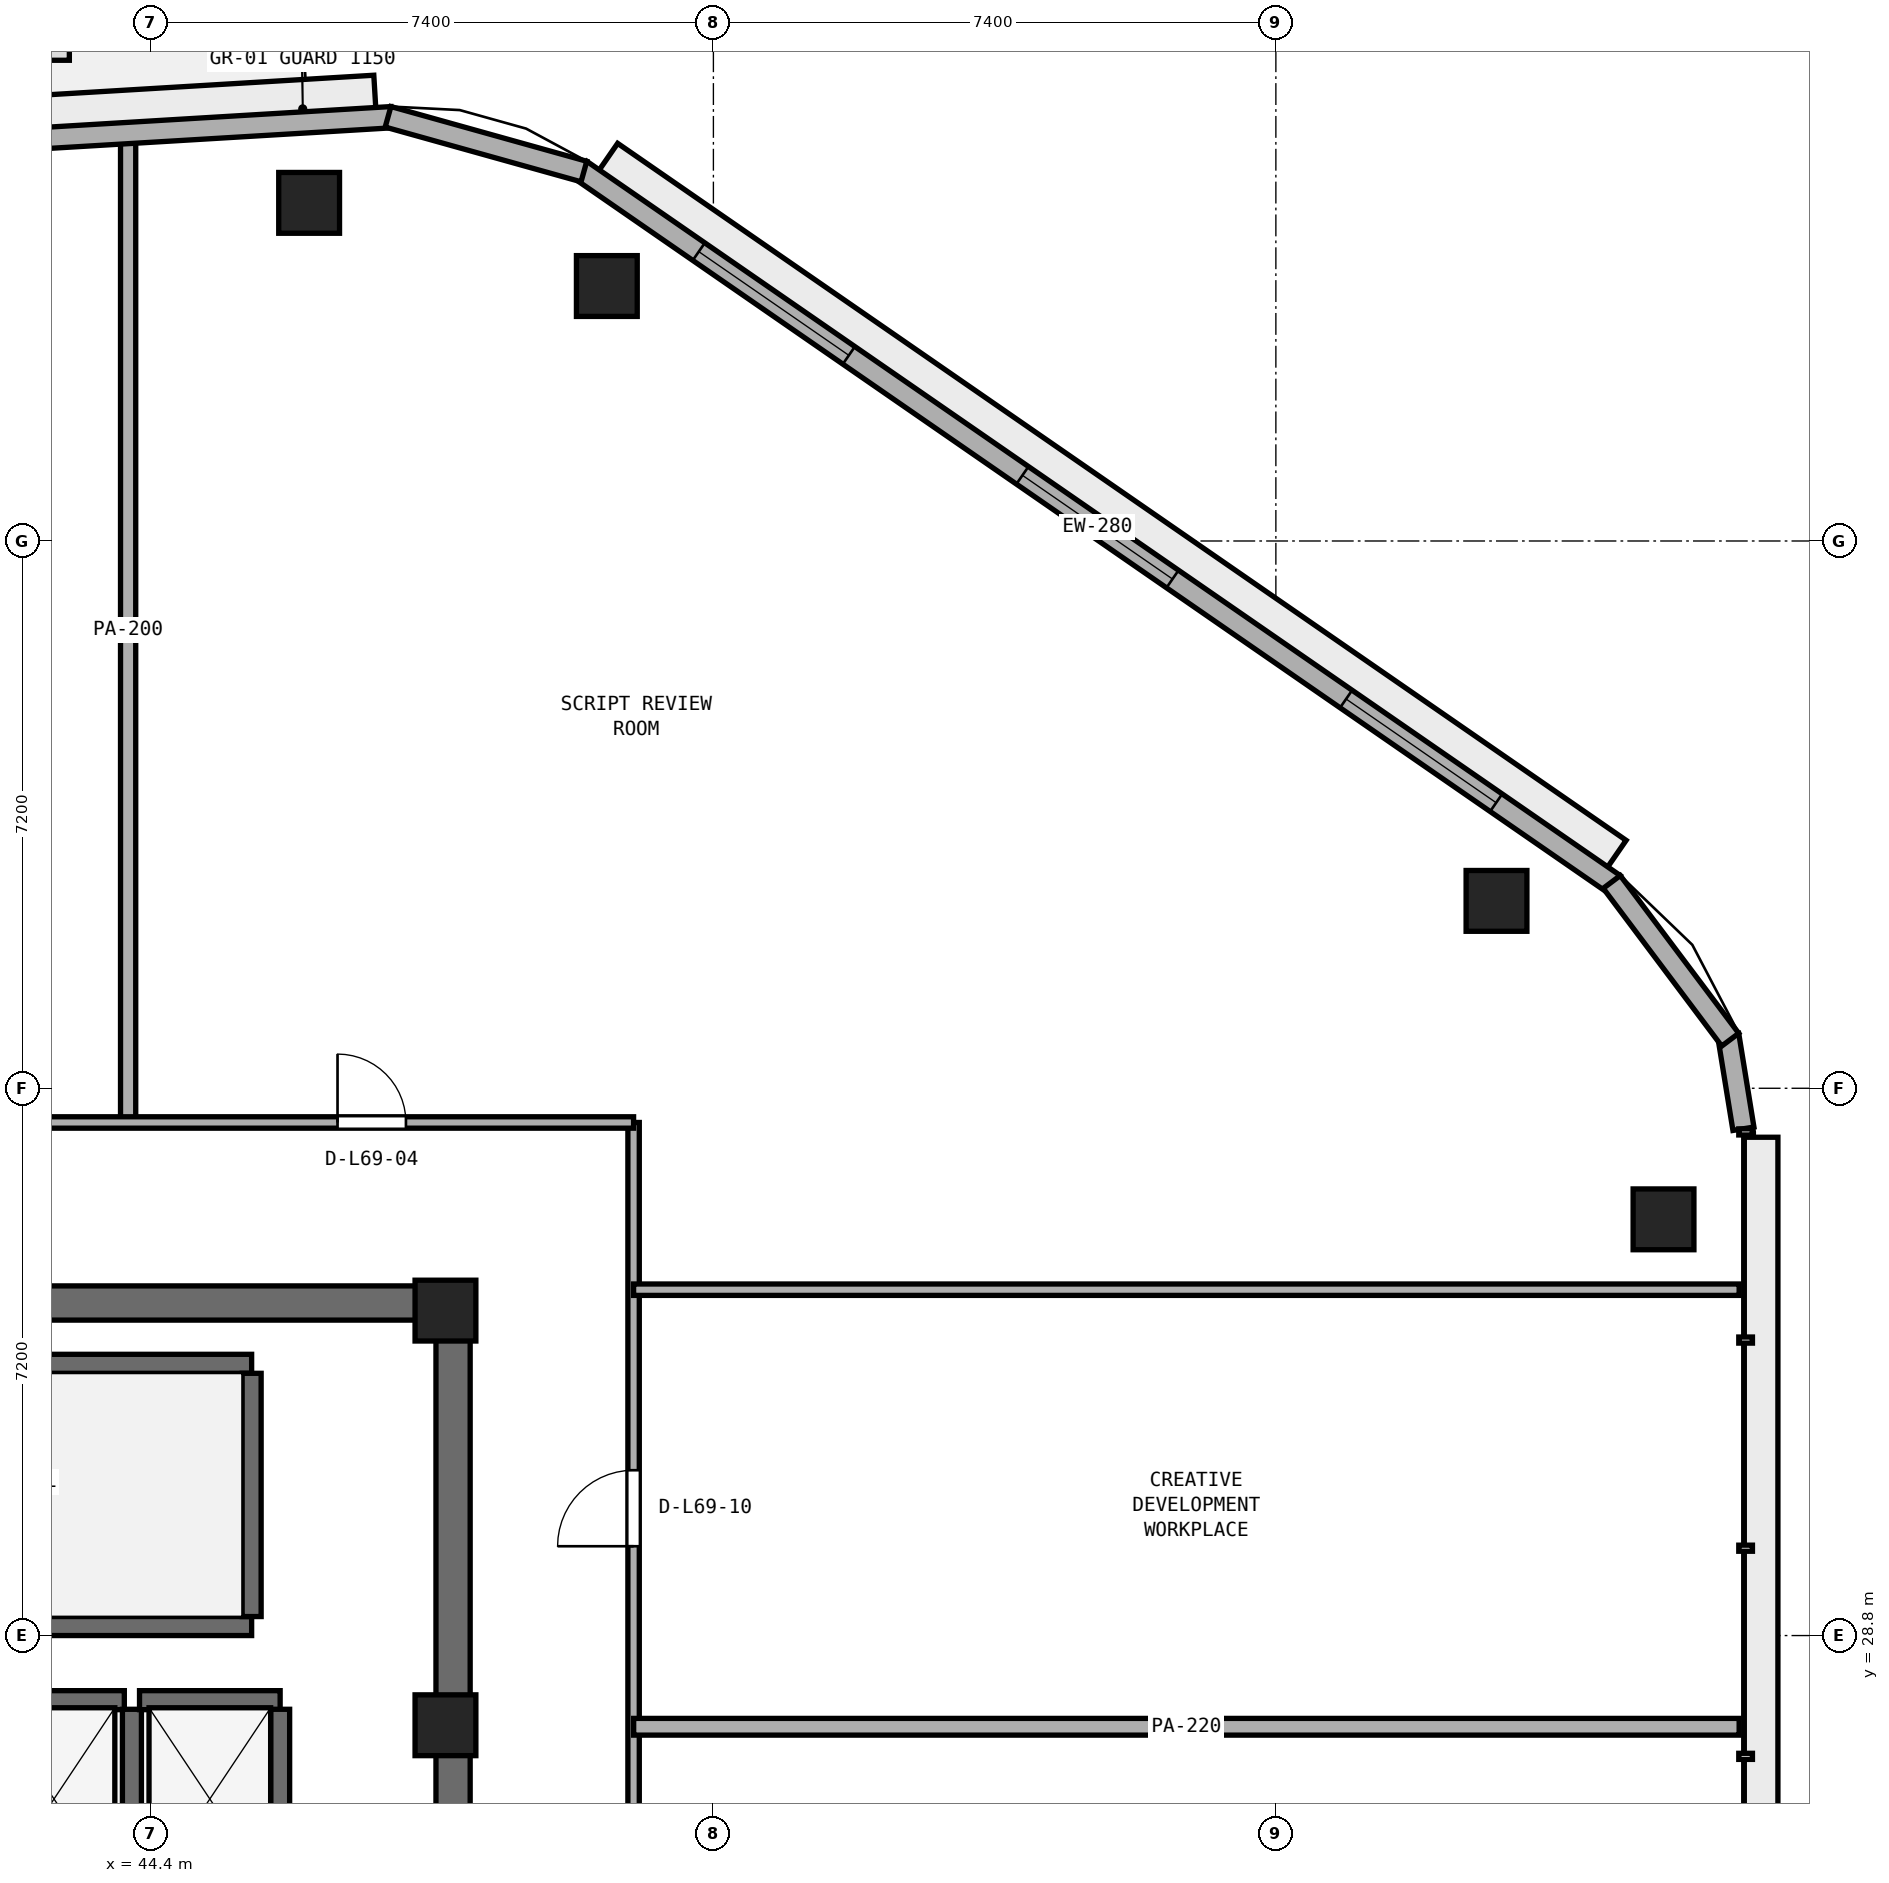
"""IFC4 building model, lengths in metres.
Left out: names, types, materials, properties, quantities, classifications, styles, units other than length and angle.
Written with IfcOpenShell. Run it as: python <this file> out.ifc"""

import sys

from ifc_helpers import new_model, si_unit, direction, frame, frame_2d, origin, origin_2d, place, context, subcontext, project, spatial, rectangle, extrude, element, fill, save


model = new_model("IFC4")
c1 = context("Model", 3, precision=1e-05, world=origin(), true_north=direction((0.0, 1.0)))
c2 = subcontext(c1, "Body", "Model", "MODEL_VIEW")
j1 = project(units=[si_unit("LENGTHUNIT", "METRE"), si_unit("PLANEANGLEUNIT", "RADIAN")], contexts=[c1])
p1 = place(None, origin())
s1 = spatial("IfcSite", under=j1, at=p1, CompositionType="ELEMENT")
p2 = place(p1, origin())
s2 = spatial("IfcBuilding", under=s1, at=p2, CompositionType="ELEMENT")
p3 = place(p2, frame((0.0, 0.0, 270.6)))
s3 = spatial("IfcBuildingStorey", under=s2, at=p3, CompositionType="ELEMENT", Elevation=270.6)
p4 = place(p3, frame((25.4, 33.175, 0.0), z_axis=(0.0, 0.0, 1.0), x_axis=(1.0, 0.0, 0.0)))
e1 = element("IfcWall", 1, at=p4, inside=s3, PredefinedType="SHEAR", context=c2, shape_type="SweptSolid", body=[
    extrude(rectangle(XDim=23.2, YDim=0.45, at=frame_2d((11.6, 0.0))), origin(), (0.0, 0.0, 1.0), 3.54),
])
p5 = place(p3, frame((48.375, 17.45, 0.0), z_axis=(0.0, 0.0, 1.0), x_axis=(0.0, 1.0, 0.0)))
e2 = element("IfcWall", 2, at=p5, inside=s3, PredefinedType="SHEAR", context=c2, shape_type="SweptSolid", body=[
    extrude(rectangle(XDim=15.5, YDim=0.45, at=frame_2d((7.75, 0.0))), origin(), (0.0, 0.0, 1.0), 3.54),
])
p6 = place(p5, frame((5.85, 0.0, 0.0)))
e3 = element("IfcOpeningElement", 3, at=p6, cuts=e2, PredefinedType="OPENING", context=c2, shape_type="SweptSolid", body=[
    extrude(rectangle(XDim=1.5, YDim=2.15, at=frame_2d((0.75, 1.075))), frame((0.0, 0.235, 0.0), z_axis=(0.0, -1.0, 0.0), x_axis=(1.0, 0.0, 0.0)), (0.0, 0.0, 1.0), 0.47),
])
for number, where, z_axis, x_axis in (
    (4, (48.275, 27.62, 0.0), (0.0, 0.0, 1.0), (1.0, 0.0, 0.0)),
    (5, (48.275, 33.075, 0.0), (0.0, 0.0, 1.0), (1.0, 0.0, 0.0)),
):
    element("IfcColumn", number, at=place(p3, frame(where, z_axis=z_axis, x_axis=x_axis)), inside=s3, PredefinedType="PILASTER", context=c2, shape_type="SweptSolid", body=[
        extrude(rectangle(XDim=0.8, YDim=0.8, at=origin_2d()), origin(), (0.0, 0.0, 1.0), 3.8),
    ])
for number, where, z_axis, x_axis in (
    (6, (64.3, 34.276, 0.0), (0.0, 0.0, 1.0), (1.0, 0.0, 0.0)),
    (7, (62.103, 38.465, 0.0), (0.0, 0.0, 1.0), (1.0, 0.0, 0.0)),
    (8, (50.398, 46.554, 0.0), (0.0, 0.0, 1.0), (1.0, 0.0, 0.0)),
    (9, (46.481, 47.648, 0.0), (0.0, 0.0, 1.0), (1.0, 0.0, 0.0)),
):
    element("IfcColumn", number, at=place(p3, frame(where, z_axis=z_axis, x_axis=x_axis)), inside=s3, PredefinedType="COLUMN", context=c2, shape_type="SweptSolid", body=[
        extrude(rectangle(XDim=0.8, YDim=0.8, at=origin_2d()), origin(), (0.0, 0.0, 1.0), 3.8),
    ])
for number, where, z_axis, x_axis in (
    (10, (38.425, 28.925, 0.0), (0.0, 0.0, 1.0), (1.0, 0.0, 0.0)),
    (11, (38.425, 32.375, 0.0), (0.0, 0.0, 1.0), (1.0, 0.0, 0.0)),
):
    element("IfcWall", number, at=place(p3, frame(where, z_axis=z_axis, x_axis=x_axis)), inside=s3, PredefinedType="SHEAR", context=c2, shape_type="SweptSolid", body=[
        extrude(rectangle(XDim=7.3, YDim=0.25, at=frame_2d((3.65, 0.0))), origin(), (0.0, 0.0, 1.0), 3.54),
    ])
p7 = place(p3, frame((45.725, 29.05, 0.0), z_axis=(0.0, 0.0, 1.0), x_axis=(0.0, 1.0, 0.0)))
e12 = element("IfcWall", 12, at=p7, inside=s3, PredefinedType="SHEAR", context=c2, shape_type="SweptSolid", body=[
    extrude(rectangle(XDim=3.2, YDim=0.25, at=frame_2d((1.6, 0.0))), origin(), (0.0, 0.0, 1.0), 3.54),
])
p8 = place(p3, frame((42.2, 27.95, 0.0), z_axis=(0.0, 0.0, 1.0), x_axis=(1.0, 0.0, 0.0)))
e13 = element("IfcWall", 13, at=p8, inside=s3, PredefinedType="SHEAR", context=c2, shape_type="SweptSolid", body=[
    extrude(rectangle(XDim=1.85, YDim=0.25, at=frame_2d((0.925, 0.0))), origin(), (0.0, 0.0, 1.0), 3.54),
])
p9 = place(p3, frame((44.15, 25.47, 0.0), z_axis=(0.0, 0.0, 1.0), x_axis=(0.0, 1.0, 0.0)))
e14 = element("IfcWall", 14, at=p9, inside=s3, PredefinedType="SHEAR", context=c2, shape_type="SweptSolid", body=[
    extrude(rectangle(XDim=2.36, YDim=0.25, at=frame_2d((1.18, 0.0))), origin(), (0.0, 0.0, 1.0), 3.54),
])
p10 = place(p3, frame((44.25, 27.95, 0.0), z_axis=(0.0, 0.0, 1.0), x_axis=(1.0, 0.0, 0.0)))
e15 = element("IfcWall", 15, at=p10, inside=s3, PredefinedType="SHEAR", context=c2, shape_type="SweptSolid", body=[
    extrude(rectangle(XDim=1.85, YDim=0.25, at=frame_2d((0.925, 0.0))), origin(), (0.0, 0.0, 1.0), 3.54),
])
p11 = place(p3, frame((46.1, 25.47, 0.0), z_axis=(0.0, 0.0, 1.0), x_axis=(0.0, 1.0, 0.0)))
e16 = element("IfcWall", 16, at=p11, inside=s3, PredefinedType="SHEAR", context=c2, shape_type="SweptSolid", body=[
    extrude(rectangle(XDim=2.36, YDim=0.25, at=frame_2d((1.18, 0.0))), origin(), (0.0, 0.0, 1.0), 3.54),
])
p12 = place(p3, frame((50.75, 22.6, 0.0), z_axis=(0.0, 0.0, 1.0), x_axis=(0.0, 1.0, 0.0)))
e17 = element("IfcWall", 17, at=p12, inside=s3, PredefinedType="PARTITIONING", context=c2, shape_type="SweptSolid", body=[
    extrude(rectangle(XDim=12.95, YDim=0.15, at=frame_2d((6.475, 0.0))), origin(), (0.0, 0.0, 1.0), 3.54),
])
p13 = place(p12, frame((2.17, 0.0, 0.0)))
e18 = element("IfcOpeningElement", 18, at=p13, cuts=e17, PredefinedType="OPENING", context=c2, shape_type="SweptSolid", body=[
    extrude(rectangle(XDim=0.9, YDim=2.1, at=frame_2d((0.45, 1.05))), frame((0.0, 0.085, 0.0), z_axis=(0.0, -1.0, 0.0), x_axis=(1.0, 0.0, 0.0)), (0.0, 0.0, 1.0), 0.17),
])
p14 = place(p12, frame((7.375, 0.0, 0.0)))
e19 = element("IfcOpeningElement", 19, at=p14, cuts=e17, PredefinedType="OPENING", context=c2, shape_type="SweptSolid", body=[
    extrude(rectangle(XDim=1.0, YDim=2.12, at=frame_2d((0.5, 1.06))), frame((0.0, 0.085, 0.0), z_axis=(0.0, -1.0, 0.0), x_axis=(1.0, 0.0, 0.0)), (0.0, 0.0, 1.0), 0.17),
])
p15 = place(p3, frame((44.1, 35.55, 0.0), z_axis=(0.0, 0.0, 1.0), x_axis=(0.0, 1.0, 0.0)))
e20 = element("IfcWall", 20, at=p15, inside=s3, PredefinedType="PARTITIONING", context=c2, shape_type="SweptSolid", body=[
    extrude(rectangle(XDim=12.953, YDim=0.2, at=frame_2d((6.476, 0.0))), origin(), (0.0, 0.0, 1.0), 3.54),
])
p16 = place(p3, frame((50.751, 27.6, 0.0), z_axis=(0.0, 0.0, 1.0), x_axis=(1.0, 0.0, 0.0)))
e21 = element("IfcWall", 21, at=p16, inside=s3, PredefinedType="PARTITIONING", context=c2, shape_type="SweptSolid", body=[
    extrude(rectangle(XDim=14.544, YDim=0.22, at=frame_2d((7.272, 0.0))), origin(), (0.0, 0.0, 1.0), 3.54),
])
p17 = place(p3, frame((50.75, 33.35, 0.0), z_axis=(0.0, 0.0, 1.0), x_axis=(1.0, 0.0, 0.0)))
e22 = element("IfcWall", 22, at=p17, inside=s3, PredefinedType="PARTITIONING", context=c2, shape_type="SweptSolid", body=[
    extrude(rectangle(XDim=14.545, YDim=0.15, at=frame_2d((7.272, 0.0))), origin(), (0.0, 0.0, 1.0), 2.19),
])
p18 = place(p3, frame((38.35, 35.55, 0.0), z_axis=(0.0, 0.0, 1.0), x_axis=(1.0, 0.0, 0.0)))
e23 = element("IfcWall", 23, at=p18, inside=s3, PredefinedType="PARTITIONING", context=c2, shape_type="SweptSolid", body=[
    extrude(rectangle(XDim=12.4, YDim=0.15, at=frame_2d((6.2, 0.0))), origin(), (0.0, 0.0, 1.0), 3.54),
])
p19 = place(p18, frame((8.505, 0.0, 0.0)))
e24 = element("IfcOpeningElement", 24, at=p19, cuts=e23, PredefinedType="OPENING", context=c2, shape_type="SweptSolid", body=[
    extrude(rectangle(XDim=0.9, YDim=2.1, at=frame_2d((0.45, 1.05))), frame((0.0, 0.085, 0.0), z_axis=(0.0, -1.0, 0.0), x_axis=(1.0, 0.0, 0.0)), (0.0, 0.0, 1.0), 0.17),
])
p20 = place(p3, frame((63.651, 38.683, 0.0), z_axis=(0.0, 0.0, 1.0), x_axis=(-0.822655095, 0.568540759022, 0.0)))
e25 = element("IfcWall", 25, at=p20, inside=s3, PredefinedType="STANDARD", context=c2, shape_type="SweptSolid", body=[
    extrude(rectangle(XDim=16.528, YDim=0.28, at=frame_2d((8.264, 0.0))), origin(), (0.0, 0.0, 1.0), 3.54),
])
p21 = place(p20, frame((1.888, 0.0, 0.9)))
e26 = element("IfcOpeningElement", 26, at=p21, cuts=e25, PredefinedType="OPENING", context=c2, shape_type="SweptSolid", body=[
    extrude(rectangle(XDim=2.4, YDim=1.75, at=frame_2d((1.2, 0.875))), frame((0.0, 0.15, 0.0), z_axis=(0.0, -1.0, 0.0), x_axis=(1.0, 0.0, 0.0)), (0.0, 0.0, 1.0), 0.3),
])
p22 = place(p20, frame((7.064, 0.0, 0.9)))
e27 = element("IfcOpeningElement", 27, at=p22, cuts=e25, PredefinedType="OPENING", context=c2, shape_type="SweptSolid", body=[
    extrude(rectangle(XDim=2.4, YDim=1.75, at=frame_2d((1.2, 0.875))), frame((0.0, 0.15, 0.0), z_axis=(0.0, -1.0, 0.0), x_axis=(1.0, 0.0, 0.0)), (0.0, 0.0, 1.0), 0.3),
])
p23 = place(p20, frame((12.24, 0.0, 0.9)))
e28 = element("IfcOpeningElement", 28, at=p23, cuts=e25, PredefinedType="OPENING", context=c2, shape_type="SweptSolid", body=[
    extrude(rectangle(XDim=2.4, YDim=1.75, at=frame_2d((1.2, 0.875))), frame((0.0, 0.15, 0.0), z_axis=(0.0, -1.0, 0.0), x_axis=(1.0, 0.0, 0.0)), (0.0, 0.0, 1.0), 0.3),
])
p24 = place(p3, frame((47.566, 48.775, 0.0), z_axis=(0.0, 0.0, 1.0), x_axis=(-0.998202767485, -0.059926913695, 0.0)))
e29 = element("IfcWall", 29, at=p24, inside=s3, PredefinedType="STANDARD", context=c2, shape_type="SweptSolid", body=[
    extrude(rectangle(XDim=19.111, YDim=0.28, at=frame_2d((9.556, 0.0))), origin(), (0.0, 0.0, 1.0), 3.54),
])
p25 = place(p24, frame((9.656, 0.0, 0.0)))
e30 = element("IfcOpeningElement", 30, at=p25, cuts=e29, PredefinedType="OPENING", context=c2, shape_type="SweptSolid", body=[
    extrude(rectangle(XDim=1.1, YDim=2.2, at=frame_2d((0.55, 1.1))), frame((0.0, 0.15, 0.0), z_axis=(0.0, -1.0, 0.0), x_axis=(1.0, 0.0, 0.0)), (0.0, 0.0, 1.0), 0.3),
])
p26 = place(p3, frame((65.351, 35.467, 0.0), z_axis=(0.0, 0.0, 1.0), x_axis=(-0.160184333482, 0.987087118398, 0.0)))
e31 = element("IfcWall", 31, at=p26, inside=s3, PredefinedType="STANDARD", context=c2, shape_type="SweptSolid", body=[
    extrude(rectangle(XDim=1.25, YDim=0.28, at=frame_2d((0.625, 0.0))), origin(), (0.0, 0.0, 1.0), 3.54),
])
p27 = place(p3, frame((65.177, 36.639, 0.0), z_axis=(0.0, 0.0, 1.0), x_axis=(-0.600436386467, 0.799672524104, 0.0)))
e32 = element("IfcWall", 32, at=p27, inside=s3, PredefinedType="STANDARD", context=c2, shape_type="SweptSolid", body=[
    extrude(rectangle(XDim=2.595, YDim=0.28, at=frame_2d((1.298, 0.0))), origin(), (0.0, 0.0, 1.0), 3.54),
])
p28 = place(p3, frame((50.096, 48.061, 0.0), z_axis=(0.0, 0.0, 1.0), x_axis=(-0.963108887091, 0.269112005688, 0.0)))
e33 = element("IfcWall", 33, at=p28, inside=s3, PredefinedType="STANDARD", context=c2, shape_type="SweptSolid", body=[
    extrude(rectangle(XDim=2.675, YDim=0.28, at=frame_2d((1.338, 0.0))), origin(), (0.0, 0.0, 1.0), 3.54),
])
p29 = place(p19, origin())
e34 = element("IfcDoor", 34, at=p29, inside=s3, OperationType="SINGLE_SWING_LEFT", PredefinedType="DOOR", context=c2, shape_type="SweptSolid", body=[
    extrude(rectangle(XDim=0.9, YDim=2.1, at=frame_2d((0.45, 1.05))), frame((0.0, 0.025, 0.0), z_axis=(0.0, -1.0, 0.0), x_axis=(1.0, 0.0, 0.0)), (0.0, 0.0, 1.0), 0.05),
])
fill(e24, e34)
p30 = place(p14, origin())
e35 = element("IfcDoor", 35, at=p30, inside=s3, OperationType="SINGLE_SWING_LEFT", PredefinedType="DOOR", context=c2, shape_type="SweptSolid", body=[
    extrude(rectangle(XDim=1.0, YDim=2.12, at=frame_2d((0.5, 1.06))), frame((0.0, 0.025, 0.0), z_axis=(0.0, -1.0, 0.0), x_axis=(1.0, 0.0, 0.0)), (0.0, 0.0, 1.0), 0.05),
])
fill(e19, e35)
p31 = place(p21, origin())
e36 = element("IfcWindow", 36, at=p31, inside=s3, PartitioningType="SINGLE_PANEL", PredefinedType="WINDOW", context=c2, shape_type="SweptSolid", body=[
    extrude(rectangle(XDim=2.4, YDim=1.75, at=frame_2d((1.2, 0.875))), frame((0.0, 0.03, 0.0), z_axis=(0.0, -1.0, 0.0), x_axis=(1.0, 0.0, 0.0)), (0.0, 0.0, 1.0), 0.06),
])
fill(e26, e36)
p32 = place(p22, origin())
e37 = element("IfcWindow", 37, at=p32, inside=s3, PartitioningType="SINGLE_PANEL", PredefinedType="WINDOW", context=c2, shape_type="SweptSolid", body=[
    extrude(rectangle(XDim=2.4, YDim=1.75, at=frame_2d((1.2, 0.875))), frame((0.0, 0.03, 0.0), z_axis=(0.0, -1.0, 0.0), x_axis=(1.0, 0.0, 0.0)), (0.0, 0.0, 1.0), 0.06),
])
fill(e27, e37)
p33 = place(p23, origin())
e38 = element("IfcWindow", 38, at=p33, inside=s3, PartitioningType="SINGLE_PANEL", PredefinedType="WINDOW", context=c2, shape_type="SweptSolid", body=[
    extrude(rectangle(XDim=2.4, YDim=1.75, at=frame_2d((1.2, 0.875))), frame((0.0, 0.03, 0.0), z_axis=(0.0, -1.0, 0.0), x_axis=(1.0, 0.0, 0.0)), (0.0, 0.0, 1.0), 0.06),
])
fill(e28, e38)
save(model, sys.argv[1])
